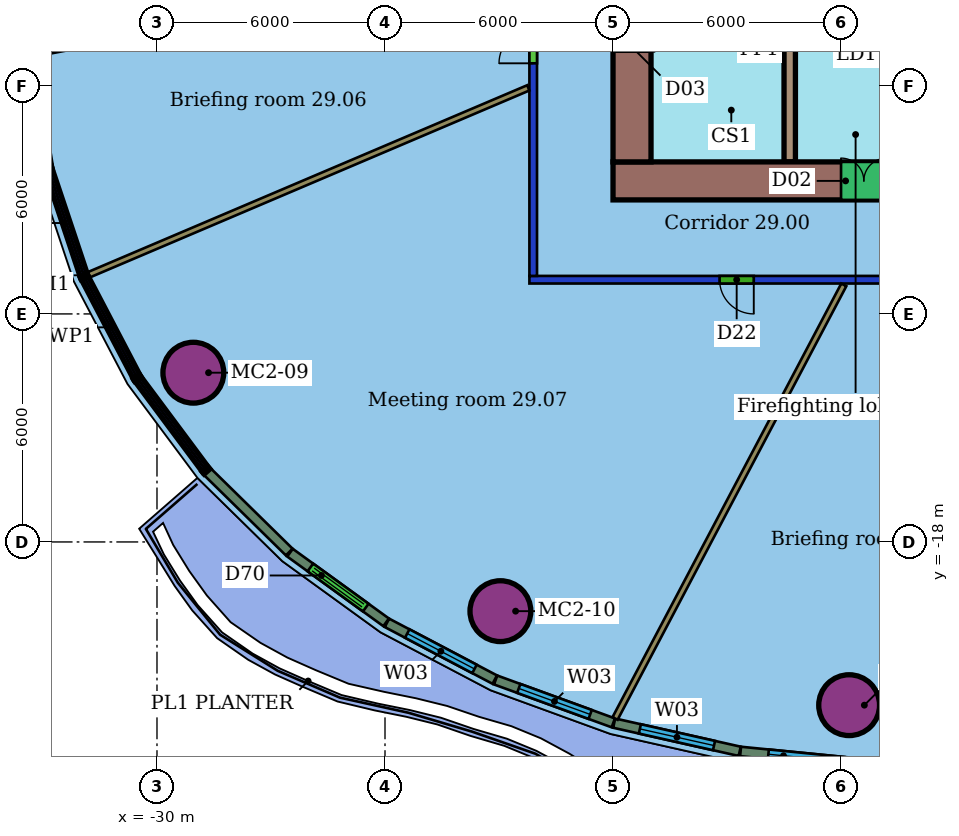
"""IFC4 building model, lengths in metres.
Left out: names, types, materials, properties, quantities, classifications, styles, units other than length and angle.
Written with IfcOpenShell. Run it as: python <this file> out.ifc"""

import sys

from ifc_helpers import new_model, si_unit, direction, frame, frame_2d, origin, origin_2d, place, context, subcontext, project, spatial, rectangle, hollow_circle, extrude, element, fill, save


model = new_model("IFC4")
c1 = context("Model", 3, precision=1e-05, world=origin(), true_north=direction((0.0, 1.0)))
c2 = subcontext(c1, "Body", "Model", "MODEL_VIEW")
j1 = project(units=[si_unit("LENGTHUNIT", "METRE"), si_unit("PLANEANGLEUNIT", "RADIAN")], contexts=[c1])
p1 = place(None, origin())
s1 = spatial("IfcSite", under=j1, at=p1, CompositionType="ELEMENT")
p2 = place(p1, origin())
s2 = spatial("IfcBuilding", under=s1, at=p2, CompositionType="ELEMENT")
p3 = place(p2, frame((0.0, 0.0, 124.6)))
s3 = spatial("IfcBuildingStorey", under=s2, at=p3, CompositionType="ELEMENT", Elevation=124.6)
for number, where, z_axis, x_axis in (
    (1, (-29.043, -13.547, 0.0), (0.0, 0.0, 1.0), (1.0, 0.0, 0.0)),
    (2, (-20.963, -19.821, 0.0), (0.0, 0.0, 1.0), (1.0, 0.0, 0.0)),
    (3, (-11.787, -22.294, 0.0), (0.0, 0.0, 1.0), (1.0, 0.0, 0.0)),
):
    element("IfcColumn", number, at=place(p3, frame(where, z_axis=z_axis, x_axis=x_axis)), inside=s3, PredefinedType="COLUMN", context=c2, shape_type="SweptSolid", body=[
        extrude(hollow_circle(Radius=0.8, WallThickness=0.055, at=origin_2d()), origin(), (0.0, 0.0, 1.0), 3.45),
    ])
p4 = place(p3, frame((8.2, -11.1, 0.0), z_axis=(0.0, 0.0, 1.0), x_axis=(-1.0, 0.0, 0.0)))
e4 = element("IfcWall", 4, at=p4, inside=s3, PredefinedType="PARTITIONING", context=c2, shape_type="SweptSolid", body=[
    extrude(rectangle(XDim=28.4, YDim=0.2, at=frame_2d((14.2, 0.0))), origin(), (0.0, 0.0, 1.0), 3.0),
])
p5 = place(p4, frame((22.496, 0.0, 0.0)))
e5 = element("IfcOpeningElement", 5, at=p5, cuts=e4, PredefinedType="OPENING", context=c2, shape_type="SweptSolid", body=[
    extrude(rectangle(XDim=0.9, YDim=2.1, at=frame_2d((0.45, 1.05))), frame((0.0, 0.11, 0.0), z_axis=(0.0, -1.0, 0.0), x_axis=(1.0, 0.0, 0.0)), (0.0, 0.0, 1.0), 0.22),
])
p6 = place(p4, frame((17.136, 0.0, 0.0)))
e6 = element("IfcOpeningElement", 6, at=p6, cuts=e4, PredefinedType="OPENING", context=c2, shape_type="SweptSolid", body=[
    extrude(rectangle(XDim=1.8, YDim=2.4, at=frame_2d((0.9, 1.2))), frame((0.0, 0.11, 0.0), z_axis=(0.0, -1.0, 0.0), x_axis=(1.0, 0.0, 0.0)), (0.0, 0.0, 1.0), 0.22),
])
p7 = place(p4, frame((12.396, 0.0, 0.0)))
e7 = element("IfcOpeningElement", 7, at=p7, cuts=e4, PredefinedType="OPENING", context=c2, shape_type="SweptSolid", body=[
    extrude(rectangle(XDim=0.9, YDim=2.1, at=frame_2d((0.45, 1.05))), frame((0.0, 0.11, 0.0), z_axis=(0.0, -1.0, 0.0), x_axis=(1.0, 0.0, 0.0)), (0.0, 0.0, 1.0), 0.22),
])
p8 = place(p4, frame((8.099, 0.0, 0.0)))
e8 = element("IfcOpeningElement", 8, at=p8, cuts=e4, PredefinedType="OPENING", context=c2, shape_type="SweptSolid", body=[
    extrude(rectangle(XDim=1.5, YDim=2.1, at=frame_2d((0.75, 1.05))), frame((0.0, 0.11, 0.0), z_axis=(0.0, -1.0, 0.0), x_axis=(1.0, 0.0, 0.0)), (0.0, 0.0, 1.0), 0.22),
])
p9 = place(p3, frame((-20.1, -11.0, 0.0), z_axis=(0.0, 0.0, 1.0), x_axis=(0.0, 1.0, 0.0)))
e9 = element("IfcWall", 9, at=p9, inside=s3, PredefinedType="PARTITIONING", context=c2, shape_type="SweptSolid", body=[
    extrude(rectangle(XDim=22.0, YDim=0.2, at=frame_2d((11.0, 0.0))), origin(), (0.0, 0.0, 1.0), 3.0),
])
p10 = place(p9, frame((15.057, 0.0, 0.0)))
e10 = element("IfcOpeningElement", 10, at=p10, cuts=e9, PredefinedType="OPENING", context=c2, shape_type="SweptSolid", body=[
    extrude(rectangle(XDim=1.0, YDim=2.1, at=frame_2d((0.5, 1.05))), frame((0.0, 0.11, 0.0), z_axis=(0.0, -1.0, 0.0), x_axis=(1.0, 0.0, 0.0)), (0.0, 0.0, 1.0), 0.22),
])
p11 = place(p9, frame((9.649, 0.0, 0.0)))
e11 = element("IfcOpeningElement", 11, at=p11, cuts=e9, PredefinedType="OPENING", context=c2, shape_type="SweptSolid", body=[
    extrude(rectangle(XDim=1.0, YDim=2.4, at=frame_2d((0.5, 1.2))), frame((0.0, 0.11, 0.0), z_axis=(0.0, -1.0, 0.0), x_axis=(1.0, 0.0, 0.0)), (0.0, 0.0, 1.0), 0.22),
])
p12 = place(p9, frame((5.594, 0.0, 0.0)))
e12 = element("IfcOpeningElement", 12, at=p12, cuts=e9, PredefinedType="OPENING", context=c2, shape_type="SweptSolid", body=[
    extrude(rectangle(XDim=1.8, YDim=2.4, at=frame_2d((0.9, 1.2))), frame((0.0, 0.11, 0.0), z_axis=(0.0, -1.0, 0.0), x_axis=(1.0, 0.0, 0.0)), (0.0, 0.0, 1.0), 0.22),
])
p13 = place(p3, frame((-33.238, -5.168, 0.0), z_axis=(0.0, 0.0, 1.0), x_axis=(0.982472572184, 0.186407201863, 0.0)))
e13 = element("IfcWall", 13, at=p13, inside=s3, PredefinedType="PARTITIONING", context=c2, shape_type="SweptSolid", body=[
    extrude(rectangle(XDim=13.258, YDim=0.125, at=frame_2d((6.629, 0.0))), origin(), (0.0, 0.0, 1.0), 3.45),
])
p14 = place(p3, frame((-31.8, -10.973, 0.0), z_axis=(0.0, 0.0, 1.0), x_axis=(0.920233208225, 0.391370467052, 0.0)))
e14 = element("IfcWall", 14, at=p14, inside=s3, PredefinedType="PARTITIONING", context=c2, shape_type="SweptSolid", body=[
    extrude(rectangle(XDim=12.573, YDim=0.15, at=frame_2d((6.287, 0.0))), origin(), (0.0, 0.0, 1.0), 3.45),
])
p15 = place(p3, frame((-17.946, -22.644, 0.0), z_axis=(0.0, 0.0, 1.0), x_axis=(0.466623744036, 0.884455924002, 0.0)))
e15 = element("IfcWall", 15, at=p15, inside=s3, PredefinedType="PARTITIONING", context=c2, shape_type="SweptSolid", body=[
    extrude(rectangle(XDim=12.9, YDim=0.15, at=frame_2d((6.45, 0.0))), origin(), (0.0, 0.0, 1.0), 3.45),
])
p16 = place(p3, frame((-28.671, -16.155, 0.0), z_axis=(0.0, 0.0, 1.0), x_axis=(0.713759845589, -0.700390521656, 0.0)))
e16 = element("IfcWall", 16, at=p16, inside=s3, PredefinedType="SOLIDWALL", context=c2, shape_type="SweptSolid", body=[
    extrude(rectangle(XDim=3.013, YDim=0.25, at=frame_2d((1.507, 0.0))), origin(), (0.0, 0.0, 1.0), 3.05),
])
p17 = place(p3, frame((-26.5, -18.283, 0.0), z_axis=(0.0, 0.0, 1.0), x_axis=(0.809860169176, -0.586622967828, 0.0)))
e17 = element("IfcWall", 17, at=p17, inside=s3, PredefinedType="SOLIDWALL", context=c2, shape_type="SweptSolid", body=[
    extrude(rectangle(XDim=3.124, YDim=0.25, at=frame_2d((1.562, 0.0))), origin(), (0.0, 0.0, 1.0), 3.05),
])
p18 = place(p17, frame((0.662, 0.0, 0.0)))
e18 = element("IfcOpeningElement", 18, at=p18, cuts=e17, PredefinedType="OPENING", context=c2, shape_type="SweptSolid", body=[
    extrude(rectangle(XDim=1.8, YDim=2.4, at=frame_2d((0.9, 1.2))), frame((0.0, 0.135, 0.0), z_axis=(0.0, -1.0, 0.0), x_axis=(1.0, 0.0, 0.0)), (0.0, 0.0, 1.0), 0.27),
])
p19 = place(p3, frame((-23.948, -20.129, 0.0), z_axis=(0.0, 0.0, 1.0), x_axis=(0.884863700739, -0.465850009245, 0.0)))
e19 = element("IfcWall", 19, at=p19, inside=s3, PredefinedType="SOLIDWALL", context=c2, shape_type="SweptSolid", body=[
    extrude(rectangle(XDim=3.206, YDim=0.25, at=frame_2d((1.603, 0.0))), origin(), (0.0, 0.0, 1.0), 3.05),
])
p20 = place(p19, frame((0.603, 0.0, 0.9)))
e20 = element("IfcOpeningElement", 20, at=p20, cuts=e19, PredefinedType="OPENING", context=c2, shape_type="SweptSolid", body=[
    extrude(rectangle(XDim=2.0, YDim=2.1, at=frame_2d((1.0, 1.05))), frame((0.0, 0.135, 0.0), z_axis=(0.0, -1.0, 0.0), x_axis=(1.0, 0.0, 0.0)), (0.0, 0.0, 1.0), 0.27),
])
p21 = place(p3, frame((-21.089, -21.632, 0.0), z_axis=(0.0, 0.0, 1.0), x_axis=(0.939579104827, -0.342331864969, 0.0)))
e21 = element("IfcWall", 21, at=p21, inside=s3, PredefinedType="SOLIDWALL", context=c2, shape_type="SweptSolid", body=[
    extrude(rectangle(XDim=3.296, YDim=0.25, at=frame_2d((1.648, 0.0))), origin(), (0.0, 0.0, 1.0), 3.05),
])
p22 = place(p21, frame((0.648, 0.0, 0.9)))
e22 = element("IfcOpeningElement", 22, at=p22, cuts=e21, PredefinedType="OPENING", context=c2, shape_type="SweptSolid", body=[
    extrude(rectangle(XDim=2.0, YDim=2.1, at=frame_2d((1.0, 1.05))), frame((0.0, 0.135, 0.0), z_axis=(0.0, -1.0, 0.0), x_axis=(1.0, 0.0, 0.0)), (0.0, 0.0, 1.0), 0.27),
])
p23 = place(p3, frame((-17.969, -22.767, 0.0), z_axis=(0.0, 0.0, 1.0), x_axis=(0.975690768568, -0.219151828949, 0.0)))
e23 = element("IfcWall", 23, at=p23, inside=s3, PredefinedType="SOLIDWALL", context=c2, shape_type="SweptSolid", body=[
    extrude(rectangle(XDim=3.385, YDim=0.25, at=frame_2d((1.693, 0.0))), origin(), (0.0, 0.0, 1.0), 3.05),
])
p24 = place(p23, frame((0.693, 0.0, 0.9)))
e24 = element("IfcOpeningElement", 24, at=p24, cuts=e23, PredefinedType="OPENING", context=c2, shape_type="SweptSolid", body=[
    extrude(rectangle(XDim=2.0, YDim=2.1, at=frame_2d((1.0, 1.05))), frame((0.0, 0.135, 0.0), z_axis=(0.0, -1.0, 0.0), x_axis=(1.0, 0.0, 0.0)), (0.0, 0.0, 1.0), 0.27),
])
p25 = place(p3, frame((-14.643, -23.513, 0.0), z_axis=(0.0, 0.0, 1.0), x_axis=(0.995116970578, -0.09870265887, 0.0)))
e25 = element("IfcWall", 25, at=p25, inside=s3, PredefinedType="SOLIDWALL", context=c2, shape_type="SweptSolid", body=[
    extrude(rectangle(XDim=3.47, YDim=0.25, at=frame_2d((1.735, 0.0))), origin(), (0.0, 0.0, 1.0), 3.05),
])
p26 = place(p25, frame((0.735, 0.0, 0.9)))
e26 = element("IfcOpeningElement", 26, at=p26, cuts=e25, PredefinedType="OPENING", context=c2, shape_type="SweptSolid", body=[
    extrude(rectangle(XDim=2.0, YDim=2.1, at=frame_2d((1.0, 1.05))), frame((0.0, 0.135, 0.0), z_axis=(0.0, -1.0, 0.0), x_axis=(1.0, 0.0, 0.0)), (0.0, 0.0, 1.0), 0.27),
])
p27 = place(p3, frame((-18.0, -8.5, 0.0), z_axis=(0.0, 0.0, 1.0), x_axis=(1.0, 0.0, 0.0)))
e27 = element("IfcWall", 27, at=p27, inside=s3, PredefinedType="SHEAR", context=c2, shape_type="SweptSolid", body=[
    extrude(rectangle(XDim=24.0, YDim=1.0, at=frame_2d((12.0, 0.0))), origin(), (0.0, 0.0, 1.0), 3.3),
])
p28 = place(p27, frame((6.0, 0.0, 0.0)))
e28 = element("IfcOpeningElement", 28, at=p28, cuts=e27, PredefinedType="OPENING", context=c2, shape_type="SweptSolid", body=[
    extrude(rectangle(XDim=1.2, YDim=2.1, at=frame_2d((0.6, 1.05))), frame((0.0, 0.51, 0.0), z_axis=(0.0, -1.0, 0.0), x_axis=(1.0, 0.0, 0.0)), (0.0, 0.0, 1.0), 1.02),
])
p29 = place(p3, frame((-17.5, 8.0, 0.0), z_axis=(0.0, 0.0, 1.0), x_axis=(0.0, -1.0, 0.0)))
e29 = element("IfcWall", 29, at=p29, inside=s3, PredefinedType="SHEAR", context=c2, shape_type="SweptSolid", body=[
    extrude(rectangle(XDim=16.0, YDim=1.0, at=frame_2d((8.0, 0.0))), origin(), (0.0, 0.0, 1.0), 3.3),
])
p30 = place(p29, frame((11.9, 0.0, 0.0)))
e30 = element("IfcOpeningElement", 30, at=p30, cuts=e29, PredefinedType="OPENING", context=c2, shape_type="SweptSolid", body=[
    extrude(rectangle(XDim=1.2, YDim=2.1, at=frame_2d((0.6, 1.05))), frame((0.0, 0.51, 0.0), z_axis=(0.0, -1.0, 0.0), x_axis=(1.0, 0.0, 0.0)), (0.0, 0.0, 1.0), 1.02),
])
p31 = place(p29, frame((2.9, 0.0, 0.0)))
e31 = element("IfcOpeningElement", 31, at=p31, cuts=e29, PredefinedType="OPENING", context=c2, shape_type="SweptSolid", body=[
    extrude(rectangle(XDim=1.2, YDim=2.1, at=frame_2d((0.6, 1.05))), frame((0.0, 0.51, 0.0), z_axis=(0.0, -1.0, 0.0), x_axis=(1.0, 0.0, 0.0)), (0.0, 0.0, 1.0), 1.02),
])
p32 = place(p3, frame((-13.35, 8.0, 0.0), z_axis=(0.0, 0.0, 1.0), x_axis=(0.0, -1.0, 0.0)))
e32 = element("IfcWall", 32, at=p32, inside=s3, PredefinedType="SHEAR", context=c2, shape_type="SweptSolid", body=[
    extrude(rectangle(XDim=16.0, YDim=0.3, at=frame_2d((8.0, 0.0))), origin(), (0.0, 0.0, 1.0), 3.3),
])
p33 = place(p32, frame((7.25, 0.0, 0.0)))
e33 = element("IfcOpeningElement", 33, at=p33, cuts=e32, PredefinedType="OPENING", context=c2, shape_type="SweptSolid", body=[
    extrude(rectangle(XDim=1.5, YDim=2.1, at=frame_2d((0.75, 1.05))), frame((0.0, 0.16, 0.0), z_axis=(0.0, -1.0, 0.0), x_axis=(1.0, 0.0, 0.0)), (0.0, 0.0, 1.0), 0.32),
])
p34 = place(p12, origin())
e34 = element("IfcDoor", 34, at=p34, inside=s3, OperationType="DOUBLE_DOOR_SINGLE_SWING", PredefinedType="DOOR", context=c2, shape_type="SweptSolid", body=[
    extrude(rectangle(XDim=1.8, YDim=2.4, at=frame_2d((0.9, 1.2))), frame((0.0, 0.025, 0.0), z_axis=(0.0, -1.0, 0.0), x_axis=(1.0, 0.0, 0.0)), (0.0, 0.0, 1.0), 0.05),
])
fill(e12, e34)
p35 = place(p5, origin())
e35 = element("IfcDoor", 35, at=p35, inside=s3, OperationType="SINGLE_SWING_LEFT", PredefinedType="DOOR", context=c2, shape_type="SweptSolid", body=[
    extrude(rectangle(XDim=0.9, YDim=2.1, at=frame_2d((0.45, 1.05))), frame((0.0, 0.025, 0.0), z_axis=(0.0, -1.0, 0.0), x_axis=(1.0, 0.0, 0.0)), (0.0, 0.0, 1.0), 0.05),
])
fill(e5, e35)
p36 = place(p18, origin())
e36 = element("IfcDoor", 36, at=p36, inside=s3, OperationType="DOUBLE_DOOR_SLIDING", PredefinedType="DOOR", context=c2, shape_type="SweptSolid", body=[
    extrude(rectangle(XDim=1.8, YDim=2.4, at=frame_2d((0.9, 1.2))), frame((0.0, 0.025, 0.0), z_axis=(0.0, -1.0, 0.0), x_axis=(1.0, 0.0, 0.0)), (0.0, 0.0, 1.0), 0.05),
])
fill(e18, e36)
p37 = place(p20, origin())
e37 = element("IfcWindow", 37, at=p37, inside=s3, PartitioningType="SINGLE_PANEL", PredefinedType="WINDOW", context=c2, shape_type="SweptSolid", body=[
    extrude(rectangle(XDim=2.0, YDim=2.1, at=frame_2d((1.0, 1.05))), frame((0.0, 0.03, 0.0), z_axis=(0.0, -1.0, 0.0), x_axis=(1.0, 0.0, 0.0)), (0.0, 0.0, 1.0), 0.06),
])
fill(e20, e37)
p38 = place(p22, origin())
e38 = element("IfcWindow", 38, at=p38, inside=s3, PartitioningType="SINGLE_PANEL", PredefinedType="WINDOW", context=c2, shape_type="SweptSolid", body=[
    extrude(rectangle(XDim=2.0, YDim=2.1, at=frame_2d((1.0, 1.05))), frame((0.0, 0.03, 0.0), z_axis=(0.0, -1.0, 0.0), x_axis=(1.0, 0.0, 0.0)), (0.0, 0.0, 1.0), 0.06),
])
fill(e22, e38)
p39 = place(p24, origin())
e39 = element("IfcWindow", 39, at=p39, inside=s3, PartitioningType="SINGLE_PANEL", PredefinedType="WINDOW", context=c2, shape_type="SweptSolid", body=[
    extrude(rectangle(XDim=2.0, YDim=2.1, at=frame_2d((1.0, 1.05))), frame((0.0, 0.03, 0.0), z_axis=(0.0, -1.0, 0.0), x_axis=(1.0, 0.0, 0.0)), (0.0, 0.0, 1.0), 0.06),
])
fill(e24, e39)
p40 = place(p26, origin())
e40 = element("IfcWindow", 40, at=p40, inside=s3, PartitioningType="SINGLE_PANEL", PredefinedType="WINDOW", context=c2, shape_type="SweptSolid", body=[
    extrude(rectangle(XDim=2.0, YDim=2.1, at=frame_2d((1.0, 1.05))), frame((0.0, 0.03, 0.0), z_axis=(0.0, -1.0, 0.0), x_axis=(1.0, 0.0, 0.0)), (0.0, 0.0, 1.0), 0.06),
])
fill(e26, e40)
p41 = place(p28, origin())
e41 = element("IfcDoor", 41, at=p41, inside=s3, OperationType="DOUBLE_DOOR_SINGLE_SWING", PredefinedType="NOTDEFINED", context=c2, shape_type="SweptSolid", body=[
    extrude(rectangle(XDim=1.2, YDim=2.1, at=frame_2d((0.6, 1.05))), frame((0.0, 0.025, 0.0), z_axis=(0.0, -1.0, 0.0), x_axis=(1.0, 0.0, 0.0)), (0.0, 0.0, 1.0), 0.05),
])
fill(e28, e41)
save(model, sys.argv[1])
